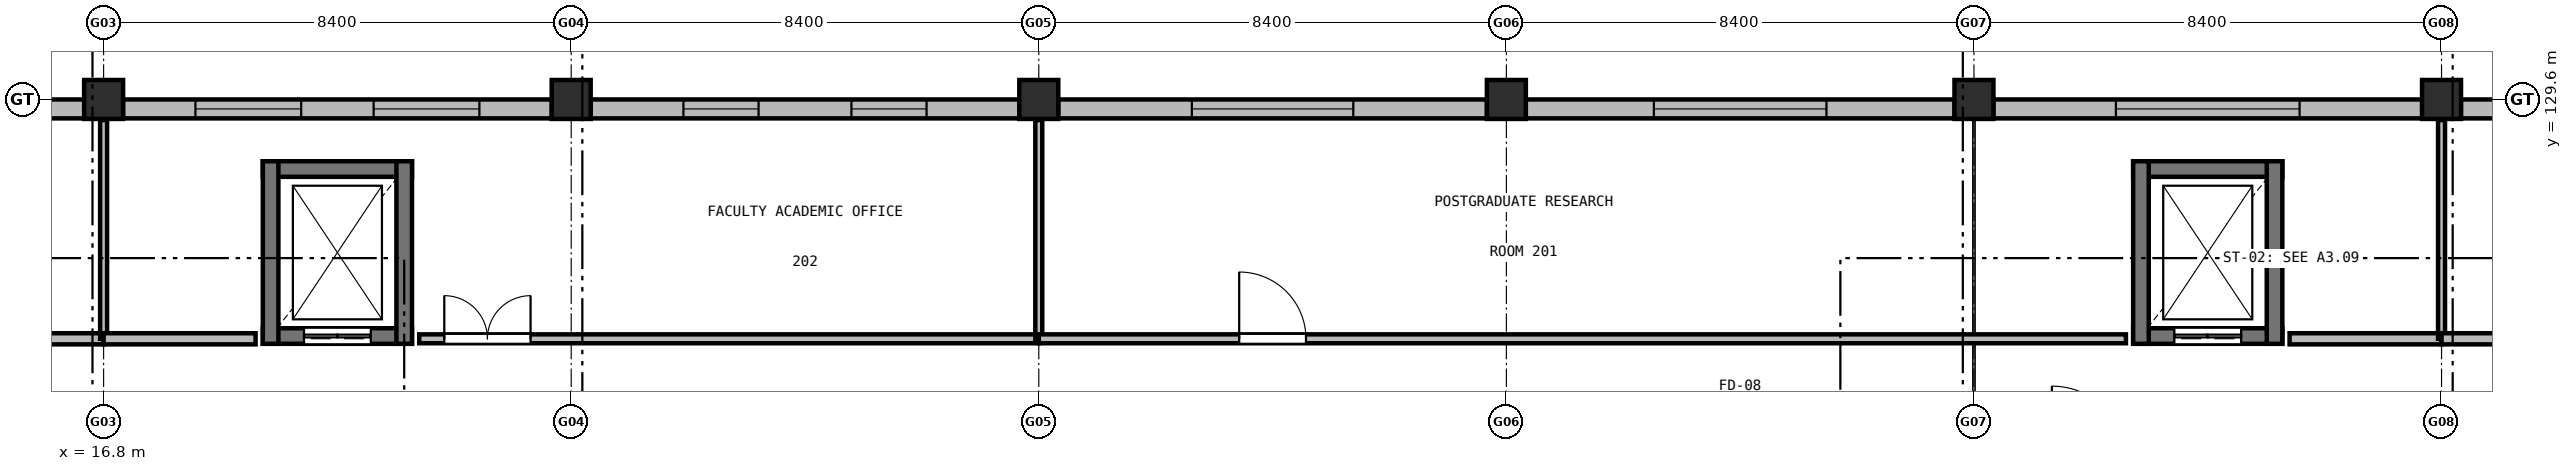
"""IFC4 building model, lengths in metres.
Left out: names, types, materials, properties, quantities, classifications, styles, units other than length and angle.
Written with IfcOpenShell. Run it as: python <this file> out.ifc"""

import sys

from ifc_helpers import new_model, si_unit, direction, frame, frame_2d, origin, origin_2d, place, context, subcontext, project, spatial, rectangle, extrude, element, fill, save


model = new_model("IFC4")
c1 = context("Model", 3, precision=1e-05, world=origin(), true_north=direction((0.0, 1.0)))
c2 = subcontext(c1, "Body", "Model", "MODEL_VIEW")
j1 = project(units=[si_unit("LENGTHUNIT", "METRE"), si_unit("PLANEANGLEUNIT", "RADIAN")], contexts=[c1])
p1 = place(None, origin())
s1 = spatial("IfcSite", under=j1, at=p1, CompositionType="ELEMENT")
p2 = place(p1, origin())
s2 = spatial("IfcBuilding", under=s1, at=p2, CompositionType="ELEMENT")
p3 = place(p2, frame((0.0, 0.0, 9.3)))
s3 = spatial("IfcBuildingStorey", under=s2, at=p3, CompositionType="ELEMENT", Elevation=9.3)
for number, where, z_axis, x_axis in (
    (1, (16.8, 129.6, 0.0), (0.0, 0.0, 1.0), (1.0, 0.0, 0.0)),
    (2, (25.2, 129.6, 0.0), (0.0, 0.0, 1.0), (1.0, 0.0, 0.0)),
    (3, (33.6, 129.6, 0.0), (0.0, 0.0, 1.0), (1.0, 0.0, 0.0)),
    (4, (42.0, 129.6, 0.0), (0.0, 0.0, 1.0), (1.0, 0.0, 0.0)),
    (5, (50.4, 129.6, 0.0), (0.0, 0.0, 1.0), (1.0, 0.0, 0.0)),
    (6, (58.8, 129.6, 0.0), (0.0, 0.0, 1.0), (1.0, 0.0, 0.0)),
):
    element("IfcColumn", number, at=place(p3, frame(where, z_axis=z_axis, x_axis=x_axis)), inside=s3, PredefinedType="COLUMN", context=c2, shape_type="SweptSolid", body=[
        extrude(rectangle(XDim=0.7, YDim=0.7, at=origin_2d()), origin(), (0.0, 0.0, 1.0), 4.2),
    ])
p4 = place(p3, frame((8.748, 129.43, 0.0), z_axis=(0.0, 0.0, 1.0), x_axis=(1.0, 0.0, 0.0)))
e7 = element("IfcWall", 7, at=p4, inside=s3, PredefinedType="SOLIDWALL", context=c2, shape_type="SweptSolid", body=[
    extrude(rectangle(XDim=7.704, YDim=0.34, at=frame_2d((3.852, 0.0))), origin(), (0.0, 0.0, 1.0), 3.18),
])
p5 = place(p4, frame((1.035, 0.0, 0.95)))
e8 = element("IfcOpeningElement", 8, at=p5, cuts=e7, PredefinedType="OPENING", context=c2, shape_type="SweptSolid", body=[
    extrude(rectangle(XDim=2.3, YDim=1.95, at=frame_2d((1.15, 0.975))), frame((0.0, 0.18, 0.0), z_axis=(0.0, -1.0, 0.0), x_axis=(1.0, 0.0, 0.0)), (0.0, 0.0, 1.0), 0.36),
])
p6 = place(p4, frame((4.369, 0.0, 0.95)))
e9 = element("IfcOpeningElement", 9, at=p6, cuts=e7, PredefinedType="OPENING", context=c2, shape_type="SweptSolid", body=[
    extrude(rectangle(XDim=2.3, YDim=1.95, at=frame_2d((1.15, 0.975))), frame((0.0, 0.18, 0.0), z_axis=(0.0, -1.0, 0.0), x_axis=(1.0, 0.0, 0.0)), (0.0, 0.0, 1.0), 0.36),
])
p7 = place(p3, frame((17.148, 129.43, 0.0), z_axis=(0.0, 0.0, 1.0), x_axis=(1.0, 0.0, 0.0)))
e10 = element("IfcWall", 10, at=p7, inside=s3, PredefinedType="SOLIDWALL", context=c2, shape_type="SweptSolid", body=[
    extrude(rectangle(XDim=7.704, YDim=0.34, at=frame_2d((3.852, 0.0))), origin(), (0.0, 0.0, 1.0), 3.18),
])
p8 = place(p7, frame((1.301, 0.0, 0.95)))
e11 = element("IfcOpeningElement", 11, at=p8, cuts=e10, PredefinedType="OPENING", context=c2, shape_type="SweptSolid", body=[
    extrude(rectangle(XDim=1.9, YDim=1.75, at=frame_2d((0.95, 0.875))), frame((0.0, 0.18, 0.0), z_axis=(0.0, -1.0, 0.0), x_axis=(1.0, 0.0, 0.0)), (0.0, 0.0, 1.0), 0.36),
])
p9 = place(p7, frame((4.503, 0.0, 0.95)))
e12 = element("IfcOpeningElement", 12, at=p9, cuts=e10, PredefinedType="OPENING", context=c2, shape_type="SweptSolid", body=[
    extrude(rectangle(XDim=1.9, YDim=1.75, at=frame_2d((0.95, 0.875))), frame((0.0, 0.18, 0.0), z_axis=(0.0, -1.0, 0.0), x_axis=(1.0, 0.0, 0.0)), (0.0, 0.0, 1.0), 0.36),
])
p10 = place(p3, frame((25.548, 129.43, 0.0), z_axis=(0.0, 0.0, 1.0), x_axis=(1.0, 0.0, 0.0)))
e13 = element("IfcWall", 13, at=p10, inside=s3, PredefinedType="SOLIDWALL", context=c2, shape_type="SweptSolid", body=[
    extrude(rectangle(XDim=7.704, YDim=0.34, at=frame_2d((3.852, 0.0))), origin(), (0.0, 0.0, 1.0), 3.18),
])
p11 = place(p10, frame((1.668, 0.0, 0.95)))
e14 = element("IfcOpeningElement", 14, at=p11, cuts=e13, PredefinedType="OPENING", context=c2, shape_type="SweptSolid", body=[
    extrude(rectangle(XDim=1.35, YDim=1.55, at=frame_2d((0.675, 0.775))), frame((0.0, 0.18, 0.0), z_axis=(0.0, -1.0, 0.0), x_axis=(1.0, 0.0, 0.0)), (0.0, 0.0, 1.0), 0.36),
])
p12 = place(p10, frame((4.686, 0.0, 0.95)))
e15 = element("IfcOpeningElement", 15, at=p12, cuts=e13, PredefinedType="OPENING", context=c2, shape_type="SweptSolid", body=[
    extrude(rectangle(XDim=1.35, YDim=1.55, at=frame_2d((0.675, 0.775))), frame((0.0, 0.18, 0.0), z_axis=(0.0, -1.0, 0.0), x_axis=(1.0, 0.0, 0.0)), (0.0, 0.0, 1.0), 0.36),
])
p13 = place(p3, frame((33.948, 129.43, 0.0), z_axis=(0.0, 0.0, 1.0), x_axis=(1.0, 0.0, 0.0)))
e16 = element("IfcWall", 16, at=p13, inside=s3, PredefinedType="SOLIDWALL", context=c2, shape_type="SweptSolid", body=[
    extrude(rectangle(XDim=7.704, YDim=0.34, at=frame_2d((3.852, 0.0))), origin(), (0.0, 0.0, 1.0), 3.18),
])
p14 = place(p13, frame((2.402, 0.0, 0.95)))
e17 = element("IfcOpeningElement", 17, at=p14, cuts=e16, PredefinedType="OPENING", context=c2, shape_type="SweptSolid", body=[
    extrude(rectangle(XDim=2.9, YDim=1.75, at=frame_2d((1.45, 0.875))), frame((0.0, 0.18, 0.0), z_axis=(0.0, -1.0, 0.0), x_axis=(1.0, 0.0, 0.0)), (0.0, 0.0, 1.0), 0.36),
])
p15 = place(p3, frame((42.348, 129.43, 0.0), z_axis=(0.0, 0.0, 1.0), x_axis=(1.0, 0.0, 0.0)))
e18 = element("IfcWall", 18, at=p15, inside=s3, PredefinedType="SOLIDWALL", context=c2, shape_type="SweptSolid", body=[
    extrude(rectangle(XDim=7.704, YDim=0.34, at=frame_2d((3.852, 0.0))), origin(), (0.0, 0.0, 1.0), 3.18),
])
p16 = place(p15, frame((2.302, 0.0, 0.95)))
e19 = element("IfcOpeningElement", 19, at=p16, cuts=e18, PredefinedType="OPENING", context=c2, shape_type="SweptSolid", body=[
    extrude(rectangle(XDim=3.1, YDim=1.95, at=frame_2d((1.55, 0.975))), frame((0.0, 0.18, 0.0), z_axis=(0.0, -1.0, 0.0), x_axis=(1.0, 0.0, 0.0)), (0.0, 0.0, 1.0), 0.36),
])
p17 = place(p3, frame((50.748, 129.43, 0.0), z_axis=(0.0, 0.0, 1.0), x_axis=(1.0, 0.0, 0.0)))
e20 = element("IfcWall", 20, at=p17, inside=s3, PredefinedType="SOLIDWALL", context=c2, shape_type="SweptSolid", body=[
    extrude(rectangle(XDim=7.704, YDim=0.34, at=frame_2d((3.852, 0.0))), origin(), (0.0, 0.0, 1.0), 3.18),
])
p18 = place(p17, frame((2.202, 0.0, 0.95)))
e21 = element("IfcOpeningElement", 21, at=p18, cuts=e20, PredefinedType="OPENING", context=c2, shape_type="SweptSolid", body=[
    extrude(rectangle(XDim=3.3, YDim=1.65, at=frame_2d((1.65, 0.825))), frame((0.0, 0.18, 0.0), z_axis=(0.0, -1.0, 0.0), x_axis=(1.0, 0.0, 0.0)), (0.0, 0.0, 1.0), 0.36),
])
p19 = place(p3, frame((59.148, 129.43, 0.0), z_axis=(0.0, 0.0, 1.0), x_axis=(1.0, 0.0, 0.0)))
e22 = element("IfcWall", 22, at=p19, inside=s3, PredefinedType="SOLIDWALL", context=c2, shape_type="SweptSolid", body=[
    extrude(rectangle(XDim=7.704, YDim=0.34, at=frame_2d((3.852, 0.0))), origin(), (0.0, 0.0, 1.0), 3.18),
])
p20 = place(p19, frame((1.601, 0.0, 0.95)))
e23 = element("IfcOpeningElement", 23, at=p20, cuts=e22, PredefinedType="OPENING", context=c2, shape_type="SweptSolid", body=[
    extrude(rectangle(XDim=1.45, YDim=1.85, at=frame_2d((0.725, 0.925))), frame((0.0, 0.18, 0.0), z_axis=(0.0, -1.0, 0.0), x_axis=(1.0, 0.0, 0.0)), (0.0, 0.0, 1.0), 0.36),
])
p21 = place(p19, frame((4.653, 0.0, 0.95)))
e24 = element("IfcOpeningElement", 24, at=p21, cuts=e22, PredefinedType="OPENING", context=c2, shape_type="SweptSolid", body=[
    extrude(rectangle(XDim=1.45, YDim=1.85, at=frame_2d((0.725, 0.925))), frame((0.0, 0.18, 0.0), z_axis=(0.0, -1.0, 0.0), x_axis=(1.0, 0.0, 0.0)), (0.0, 0.0, 1.0), 0.36),
])
p22 = place(p3, frame((22.34, 125.35, 0.0), z_axis=(0.0, 0.0, 1.0), x_axis=(-1.0, 0.0, 0.0)))
e25 = element("IfcWall", 25, at=p22, inside=s3, PredefinedType="SHEAR", context=c2, shape_type="SweptSolid", body=[
    extrude(rectangle(XDim=2.68, YDim=0.28, at=frame_2d((1.34, 0.0))), origin(), (0.0, 0.0, 1.0), 3.94),
])
p23 = place(p22, frame((0.74, 0.0, 0.0)))
e26 = element("IfcOpeningElement", 26, at=p23, cuts=e25, PredefinedType="OPENING", context=c2, shape_type="SweptSolid", body=[
    extrude(rectangle(XDim=1.2, YDim=2.15, at=frame_2d((0.6, 1.075))), frame((0.0, 0.15, 0.0), z_axis=(0.0, -1.0, 0.0), x_axis=(1.0, 0.0, 0.0)), (0.0, 0.0, 1.0), 0.3),
])
p24 = place(p3, frame((19.66, 128.35, 0.0), z_axis=(0.0, 0.0, 1.0), x_axis=(1.0, 0.0, 0.0)))
e27 = element("IfcWall", 27, at=p24, inside=s3, PredefinedType="SHEAR", context=c2, shape_type="SweptSolid", body=[
    extrude(rectangle(XDim=2.68, YDim=0.28, at=frame_2d((1.34, 0.0))), origin(), (0.0, 0.0, 1.0), 3.94),
])
for number, where, z_axis, x_axis in (
    (28, (19.8, 125.21, 0.0), (0.0, 0.0, 1.0), (0.0, 1.0, 0.0)),
    (29, (22.2, 128.49, 0.0), (0.0, 0.0, 1.0), (0.0, -1.0, 0.0)),
):
    element("IfcWall", number, at=place(p3, frame(where, z_axis=z_axis, x_axis=x_axis)), inside=s3, PredefinedType="SHEAR", context=c2, shape_type="SweptSolid", body=[
        extrude(rectangle(XDim=3.28, YDim=0.28, at=frame_2d((1.64, 0.0))), origin(), (0.0, 0.0, 1.0), 3.94),
    ])
p25 = place(p3, frame((55.94, 125.35, 0.0), z_axis=(0.0, 0.0, 1.0), x_axis=(-1.0, 0.0, 0.0)))
e30 = element("IfcWall", 30, at=p25, inside=s3, PredefinedType="SHEAR", context=c2, shape_type="SweptSolid", body=[
    extrude(rectangle(XDim=2.68, YDim=0.28, at=frame_2d((1.34, 0.0))), origin(), (0.0, 0.0, 1.0), 3.94),
])
p26 = place(p25, frame((0.74, 0.0, 0.0)))
e31 = element("IfcOpeningElement", 31, at=p26, cuts=e30, PredefinedType="OPENING", context=c2, shape_type="SweptSolid", body=[
    extrude(rectangle(XDim=1.2, YDim=2.15, at=frame_2d((0.6, 1.075))), frame((0.0, 0.15, 0.0), z_axis=(0.0, -1.0, 0.0), x_axis=(1.0, 0.0, 0.0)), (0.0, 0.0, 1.0), 0.3),
])
p27 = place(p3, frame((53.26, 128.35, 0.0), z_axis=(0.0, 0.0, 1.0), x_axis=(1.0, 0.0, 0.0)))
e32 = element("IfcWall", 32, at=p27, inside=s3, PredefinedType="SHEAR", context=c2, shape_type="SweptSolid", body=[
    extrude(rectangle(XDim=2.68, YDim=0.28, at=frame_2d((1.34, 0.0))), origin(), (0.0, 0.0, 1.0), 3.94),
])
for number, where, z_axis, x_axis in (
    (33, (53.4, 125.21, 0.0), (0.0, 0.0, 1.0), (0.0, 1.0, 0.0)),
    (34, (55.8, 128.49, 0.0), (0.0, 0.0, 1.0), (0.0, -1.0, 0.0)),
):
    element("IfcWall", number, at=place(p3, frame(where, z_axis=z_axis, x_axis=x_axis)), inside=s3, PredefinedType="SHEAR", context=c2, shape_type="SweptSolid", body=[
        extrude(rectangle(XDim=3.28, YDim=0.28, at=frame_2d((1.64, 0.0))), origin(), (0.0, 0.0, 1.0), 3.94),
    ])
p28 = place(p3, frame((0.22, 125.3, 0.0), z_axis=(0.0, 0.0, 1.0), x_axis=(1.0, 0.0, 0.0)))
e35 = element("IfcWall", 35, at=p28, inside=s3, PredefinedType="SOLIDWALL", context=c2, shape_type="SweptSolid", body=[
    extrude(rectangle(XDim=16.58, YDim=0.2, at=frame_2d((8.29, 0.0))), origin(), (0.0, 0.0, 1.0), 3.325),
])
p29 = place(p28, frame((3.255, 0.0, 0.0)))
e36 = element("IfcOpeningElement", 36, at=p29, cuts=e35, PredefinedType="OPENING", context=c2, shape_type="SweptSolid", body=[
    extrude(rectangle(XDim=1.45, YDim=2.2, at=frame_2d((0.725, 1.1))), frame((0.0, 0.11, 0.0), z_axis=(0.0, -1.0, 0.0), x_axis=(1.0, 0.0, 0.0)), (0.0, 0.0, 1.0), 0.22),
])
p30 = place(p3, frame((16.8, 125.3, 0.0), z_axis=(0.0, 0.0, 1.0), x_axis=(0.0, 1.0, 0.0)))
e37 = element("IfcWall", 37, at=p30, inside=s3, PredefinedType="PARTITIONING", context=c2, shape_type="SweptSolid", body=[
    extrude(rectangle(XDim=3.93, YDim=0.125, at=frame_2d((1.965, 0.0))), origin(), (0.0, 0.0, 1.0), 3.175),
])
p31 = place(p3, frame((16.8, 125.3, 0.0), z_axis=(0.0, 0.0, 1.0), x_axis=(1.0, 0.0, 0.0)))
e38 = element("IfcWall", 38, at=p31, inside=s3, PredefinedType="SOLIDWALL", context=c2, shape_type="SweptSolid", body=[
    extrude(rectangle(XDim=2.73, YDim=0.2, at=frame_2d((1.365, 0.0))), origin(), (0.0, 0.0, 1.0), 3.85),
])
p32 = place(p3, frame((22.47, 125.3, 0.0), z_axis=(0.0, 0.0, 1.0), x_axis=(1.0, 0.0, 0.0)))
e39 = element("IfcWall", 39, at=p32, inside=s3, PredefinedType="PARTITIONING", context=c2, shape_type="SweptSolid", body=[
    extrude(rectangle(XDim=11.13, YDim=0.16, at=frame_2d((5.565, 0.0))), origin(), (0.0, 0.0, 1.0), 3.325),
])
p33 = place(p32, frame((0.45, 0.0, 0.0)))
e40 = element("IfcOpeningElement", 40, at=p33, cuts=e39, PredefinedType="OPENING", context=c2, shape_type="SweptSolid", body=[
    extrude(rectangle(XDim=1.55, YDim=2.2, at=frame_2d((0.775, 1.1))), frame((0.0, 0.09, 0.0), z_axis=(0.0, -1.0, 0.0), x_axis=(1.0, 0.0, 0.0)), (0.0, 0.0, 1.0), 0.18),
])
p34 = place(p3, frame((33.6, 125.3, 0.0), z_axis=(0.0, 0.0, 1.0), x_axis=(0.0, 1.0, 0.0)))
e41 = element("IfcWall", 41, at=p34, inside=s3, PredefinedType="PARTITIONING", context=c2, shape_type="SweptSolid", body=[
    extrude(rectangle(XDim=3.93, YDim=0.125, at=frame_2d((1.965, 0.0))), origin(), (0.0, 0.0, 1.0), 3.175),
])
p35 = place(p3, frame((33.6, 125.3, 0.0), z_axis=(0.0, 0.0, 1.0), x_axis=(1.0, 0.0, 0.0)))
e42 = element("IfcWall", 42, at=p35, inside=s3, PredefinedType="PARTITIONING", context=c2, shape_type="SweptSolid", body=[
    extrude(rectangle(XDim=19.53, YDim=0.16, at=frame_2d((9.765, 0.0))), origin(), (0.0, 0.0, 1.0), 3.325),
])
p36 = place(p35, frame((3.6, 0.0, 0.0)))
e43 = element("IfcOpeningElement", 43, at=p36, cuts=e42, PredefinedType="OPENING", context=c2, shape_type="SweptSolid", body=[
    extrude(rectangle(XDim=1.2, YDim=2.15, at=frame_2d((0.6, 1.075))), frame((0.0, 0.09, 0.0), z_axis=(0.0, -1.0, 0.0), x_axis=(1.0, 0.0, 0.0)), (0.0, 0.0, 1.0), 0.18),
])
p37 = place(p3, frame((56.07, 125.3, 0.0), z_axis=(0.0, 0.0, 1.0), x_axis=(1.0, 0.0, 0.0)))
e44 = element("IfcWall", 44, at=p37, inside=s3, PredefinedType="SOLIDWALL", context=c2, shape_type="SweptSolid", body=[
    extrude(rectangle(XDim=2.73, YDim=0.2, at=frame_2d((1.365, 0.0))), origin(), (0.0, 0.0, 1.0), 3.85),
])
p38 = place(p3, frame((58.8, 125.3, 0.0), z_axis=(0.0, 0.0, 1.0), x_axis=(0.0, 1.0, 0.0)))
e45 = element("IfcWall", 45, at=p38, inside=s3, PredefinedType="PARTITIONING", context=c2, shape_type="SweptSolid", body=[
    extrude(rectangle(XDim=3.93, YDim=0.125, at=frame_2d((1.965, 0.0))), origin(), (0.0, 0.0, 1.0), 3.175),
])
p39 = place(p3, frame((58.8, 125.3, 0.0), z_axis=(0.0, 0.0, 1.0), x_axis=(1.0, 0.0, 0.0)))
e46 = element("IfcWall", 46, at=p39, inside=s3, PredefinedType="SOLIDWALL", context=c2, shape_type="SweptSolid", body=[
    extrude(rectangle(XDim=36.13, YDim=0.2, at=frame_2d((18.065, 0.0))), origin(), (0.0, 0.0, 1.0), 3.325),
])
p40 = place(p39, frame((3.625, 0.0, 0.0)))
e47 = element("IfcOpeningElement", 47, at=p40, cuts=e46, PredefinedType="OPENING", context=c2, shape_type="SweptSolid", body=[
    extrude(rectangle(XDim=1.15, YDim=2.15, at=frame_2d((0.575, 1.075))), frame((0.0, 0.11, 0.0), z_axis=(0.0, -1.0, 0.0), x_axis=(1.0, 0.0, 0.0)), (0.0, 0.0, 1.0), 0.22),
])
p41 = place(p8, origin())
e48 = element("IfcWindow", 48, at=p41, inside=s3, PartitioningType="SINGLE_PANEL", PredefinedType="WINDOW", context=c2, shape_type="SweptSolid", body=[
    extrude(rectangle(XDim=1.9, YDim=1.75, at=frame_2d((0.95, 0.875))), frame((0.0, 0.03, 0.0), z_axis=(0.0, -1.0, 0.0), x_axis=(1.0, 0.0, 0.0)), (0.0, 0.0, 1.0), 0.06),
])
fill(e11, e48)
p42 = place(p9, origin())
e49 = element("IfcWindow", 49, at=p42, inside=s3, PartitioningType="SINGLE_PANEL", PredefinedType="WINDOW", context=c2, shape_type="SweptSolid", body=[
    extrude(rectangle(XDim=1.9, YDim=1.75, at=frame_2d((0.95, 0.875))), frame((0.0, 0.03, 0.0), z_axis=(0.0, -1.0, 0.0), x_axis=(1.0, 0.0, 0.0)), (0.0, 0.0, 1.0), 0.06),
])
fill(e12, e49)
p43 = place(p11, origin())
e50 = element("IfcWindow", 50, at=p43, inside=s3, PartitioningType="SINGLE_PANEL", PredefinedType="WINDOW", context=c2, shape_type="SweptSolid", body=[
    extrude(rectangle(XDim=1.35, YDim=1.55, at=frame_2d((0.675, 0.775))), frame((0.0, 0.03, 0.0), z_axis=(0.0, -1.0, 0.0), x_axis=(1.0, 0.0, 0.0)), (0.0, 0.0, 1.0), 0.06),
])
fill(e14, e50)
p44 = place(p12, origin())
e51 = element("IfcWindow", 51, at=p44, inside=s3, PartitioningType="SINGLE_PANEL", PredefinedType="WINDOW", context=c2, shape_type="SweptSolid", body=[
    extrude(rectangle(XDim=1.35, YDim=1.55, at=frame_2d((0.675, 0.775))), frame((0.0, 0.03, 0.0), z_axis=(0.0, -1.0, 0.0), x_axis=(1.0, 0.0, 0.0)), (0.0, 0.0, 1.0), 0.06),
])
fill(e15, e51)
p45 = place(p14, origin())
e52 = element("IfcWindow", 52, at=p45, inside=s3, PartitioningType="SINGLE_PANEL", PredefinedType="WINDOW", context=c2, shape_type="SweptSolid", body=[
    extrude(rectangle(XDim=2.9, YDim=1.75, at=frame_2d((1.45, 0.875))), frame((0.0, 0.03, 0.0), z_axis=(0.0, -1.0, 0.0), x_axis=(1.0, 0.0, 0.0)), (0.0, 0.0, 1.0), 0.06),
])
fill(e17, e52)
p46 = place(p16, origin())
e53 = element("IfcWindow", 53, at=p46, inside=s3, PartitioningType="SINGLE_PANEL", PredefinedType="WINDOW", context=c2, shape_type="SweptSolid", body=[
    extrude(rectangle(XDim=3.1, YDim=1.95, at=frame_2d((1.55, 0.975))), frame((0.0, 0.03, 0.0), z_axis=(0.0, -1.0, 0.0), x_axis=(1.0, 0.0, 0.0)), (0.0, 0.0, 1.0), 0.06),
])
fill(e19, e53)
p47 = place(p18, origin())
e54 = element("IfcWindow", 54, at=p47, inside=s3, PartitioningType="SINGLE_PANEL", PredefinedType="WINDOW", context=c2, shape_type="SweptSolid", body=[
    extrude(rectangle(XDim=3.3, YDim=1.65, at=frame_2d((1.65, 0.825))), frame((0.0, 0.03, 0.0), z_axis=(0.0, -1.0, 0.0), x_axis=(1.0, 0.0, 0.0)), (0.0, 0.0, 1.0), 0.06),
])
fill(e21, e54)
p48 = place(p23, origin())
e55 = element("IfcDoor", 55, at=p48, inside=s3, OperationType="DOUBLE_DOOR_SLIDING", PredefinedType="DOOR", context=c2, shape_type="SweptSolid", body=[
    extrude(rectangle(XDim=1.2, YDim=2.15, at=frame_2d((0.6, 1.075))), frame((0.0, 0.025, 0.0), z_axis=(0.0, -1.0, 0.0), x_axis=(1.0, 0.0, 0.0)), (0.0, 0.0, 1.0), 0.05),
])
fill(e26, e55)
p49 = place(p26, origin())
e56 = element("IfcDoor", 56, at=p49, inside=s3, OperationType="DOUBLE_DOOR_SLIDING", PredefinedType="DOOR", context=c2, shape_type="SweptSolid", body=[
    extrude(rectangle(XDim=1.2, YDim=2.15, at=frame_2d((0.6, 1.075))), frame((0.0, 0.025, 0.0), z_axis=(0.0, -1.0, 0.0), x_axis=(1.0, 0.0, 0.0)), (0.0, 0.0, 1.0), 0.05),
])
fill(e31, e56)
p50 = place(p33, origin())
e57 = element("IfcDoor", 57, at=p50, inside=s3, OperationType="DOUBLE_DOOR_SINGLE_SWING", PredefinedType="DOOR", context=c2, shape_type="SweptSolid", body=[
    extrude(rectangle(XDim=1.55, YDim=2.2, at=frame_2d((0.775, 1.1))), frame((0.0, 0.025, 0.0), z_axis=(0.0, -1.0, 0.0), x_axis=(1.0, 0.0, 0.0)), (0.0, 0.0, 1.0), 0.05),
])
fill(e40, e57)
p51 = place(p36, origin())
e58 = element("IfcDoor", 58, at=p51, inside=s3, OperationType="SINGLE_SWING_LEFT", PredefinedType="DOOR", context=c2, shape_type="SweptSolid", body=[
    extrude(rectangle(XDim=1.2, YDim=2.15, at=frame_2d((0.6, 1.075))), frame((0.0, 0.025, 0.0), z_axis=(0.0, -1.0, 0.0), x_axis=(1.0, 0.0, 0.0)), (0.0, 0.0, 1.0), 0.05),
])
fill(e43, e58)
save(model, sys.argv[1])
